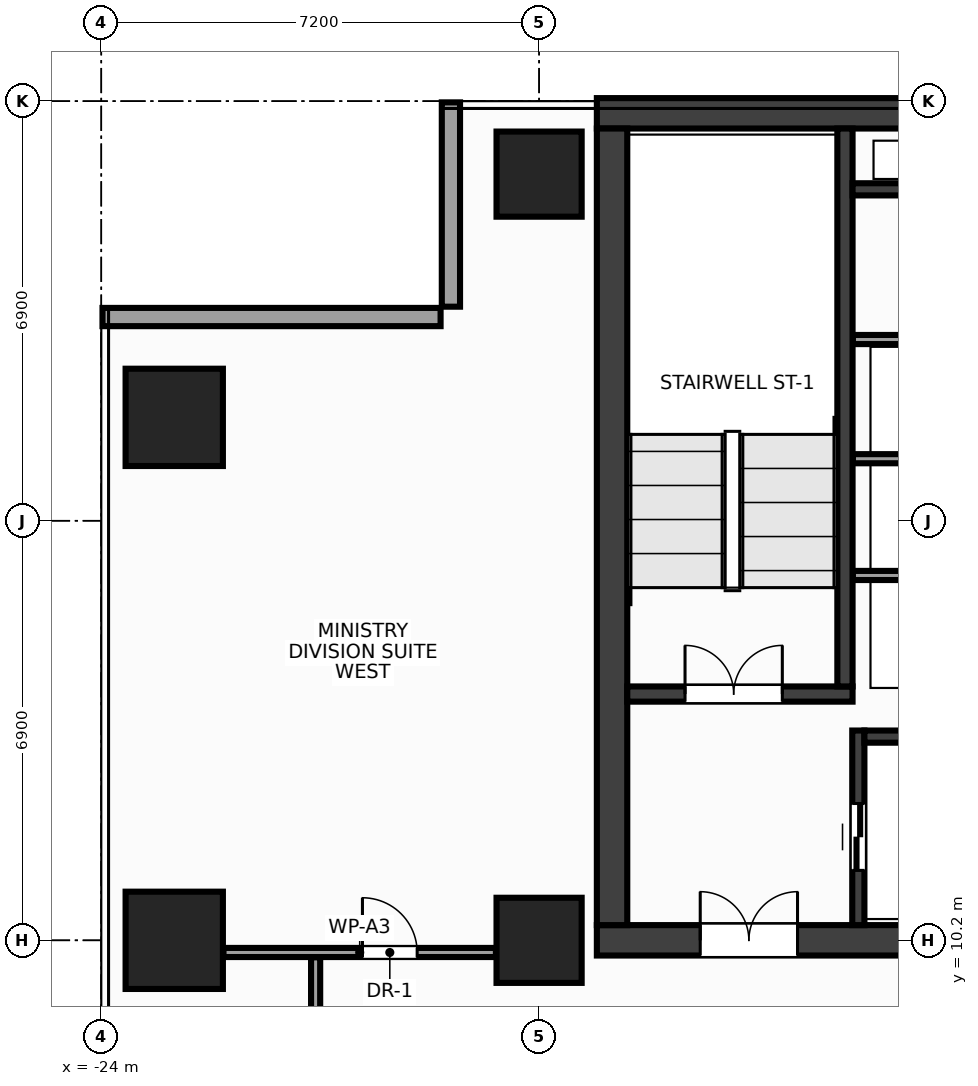
"""IFC4 building model, lengths in metres.
Left out: names, types, materials, properties, quantities, classifications, styles, units other than length and angle.
Written with IfcOpenShell. Run it as: python <this file> out.ifc"""

import sys

from ifc_helpers import new_model, si_unit, direction, frame, frame_2d, origin, origin_2d, place, context, subcontext, project, spatial, rectangle, extrude, source, transform, mapped, element, fill, save


model = new_model("IFC4")
c1 = context("Model", 3, precision=1e-05, world=origin(), true_north=direction((0.0, 1.0)))
c2 = subcontext(c1, "Body", "Model", "MODEL_VIEW")
j1 = project(units=[si_unit("LENGTHUNIT", "METRE"), si_unit("PLANEANGLEUNIT", "RADIAN")], contexts=[c1])
p1 = place(None, origin())
s1 = spatial("IfcSite", under=j1, at=p1, CompositionType="ELEMENT")
p2 = place(p1, origin())
s2 = spatial("IfcBuilding", under=s1, at=p2, CompositionType="ELEMENT")
p3 = place(p2, frame((0.0, 0.0, 210.8)))
s3 = spatial("IfcBuildingStorey", under=s2, at=p3, CompositionType="ELEMENT", Elevation=210.8)
m1 = source(origin(), c2, "Body", "SweptSolid", [
    extrude(rectangle(XDim=31.7, YDim=0.5, at=frame_2d((15.85, 0.0))), origin(), (0.0, 0.0, 1.0), 3.6),
])
p4 = place(p3, frame((-15.85, 23.8, 0.0), z_axis=(0.0, 0.0, 1.0), x_axis=(1.0, 0.0, 0.0)))
e1 = element("IfcWall", 1, at=p4, inside=s3, PredefinedType="SHEAR", context=c2, shape_type="MappedRepresentation", body=[
    mapped(m1, transform((0.0, 0.0, 0.0), x_axis=(1.0, 0.0, 0.0), y_axis=(0.0, 1.0, 0.0), z_axis=(0.0, 0.0, 1.0), scale=1.0)),
])
p5 = place(p3, frame((-15.85, 10.2, 0.0), z_axis=(0.0, 0.0, 1.0), x_axis=(1.0, 0.0, 0.0)))
e2 = element("IfcWall", 2, at=p5, inside=s3, PredefinedType="SHEAR", context=c2, shape_type="MappedRepresentation", body=[
    mapped(m1, transform((0.0, 0.0, 0.0), x_axis=(1.0, 0.0, 0.0), y_axis=(0.0, 1.0, 0.0), z_axis=(0.0, 0.0, 1.0), scale=1.0)),
])
p6 = place(p5, frame((1.7, 0.0, 0.0)))
e3 = element("IfcOpeningElement", 3, at=p6, cuts=e2, PredefinedType="OPENING", context=c2, shape_type="SweptSolid", body=[
    extrude(rectangle(XDim=1.6, YDim=2.15, at=frame_2d((0.8, 1.075))), frame((0.0, 0.262, 0.0), z_axis=(0.0, -1.0, 0.0), x_axis=(1.0, 0.0, 0.0)), (0.0, 0.0, 1.0), 0.524),
])
p7 = place(p5, frame((28.4, 0.0, 0.0)))
e4 = element("IfcOpeningElement", 4, at=p7, cuts=e2, PredefinedType="OPENING", context=c2, shape_type="SweptSolid", body=[
    extrude(rectangle(XDim=1.6, YDim=2.15, at=frame_2d((0.8, 1.075))), frame((0.0, 0.262, 0.0), z_axis=(0.0, -1.0, 0.0), x_axis=(1.0, 0.0, 0.0)), (0.0, 0.0, 1.0), 0.524),
])
p8 = place(p5, frame((15.1, 0.0, 0.0)))
e5 = element("IfcOpeningElement", 5, at=p8, cuts=e2, PredefinedType="OPENING", context=c2, shape_type="SweptSolid", body=[
    extrude(rectangle(XDim=1.5, YDim=2.2, at=frame_2d((0.75, 1.1))), frame((0.0, 0.262, 0.0), z_axis=(0.0, -1.0, 0.0), x_axis=(1.0, 0.0, 0.0)), (0.0, 0.0, 1.0), 0.524),
])
m2 = source(origin(), c2, "Body", "SweptSolid", [
    extrude(rectangle(XDim=13.1, YDim=0.5, at=frame_2d((6.55, 0.0))), origin(), (0.0, 0.0, 1.0), 3.6),
])
p9 = place(p3, frame((-15.6, 10.45, 0.0), z_axis=(0.0, 0.0, 1.0), x_axis=(0.0, 1.0, 0.0)))
e6 = element("IfcWall", 6, at=p9, inside=s3, PredefinedType="SHEAR", context=c2, shape_type="MappedRepresentation", body=[
    mapped(m2, transform((0.0, 0.0, 0.0), x_axis=(1.0, 0.0, 0.0), y_axis=(0.0, 1.0, 0.0), z_axis=(0.0, 0.0, 1.0), scale=1.0)),
])
m3 = source(origin(), c2, "Body", "SweptSolid", [
    extrude(rectangle(XDim=3.705, YDim=0.25, at=frame_2d((1.853, 0.0))), origin(), (0.0, 0.0, 1.0), 3.6),
])
p10 = place(p3, frame((-15.35, 14.25, 0.0), z_axis=(0.0, 0.0, 1.0), x_axis=(1.0, 0.0, 0.0)))
e7 = element("IfcWall", 7, at=p10, inside=s3, PredefinedType="SHEAR", context=c2, shape_type="MappedRepresentation", body=[
    mapped(m3, transform((0.0, 0.0, 0.0), x_axis=(1.0, 0.0, 0.0), y_axis=(0.0, 1.0, 0.0), z_axis=(0.0, 0.0, 1.0), scale=1.0)),
])
p11 = place(p10, frame((0.95, 0.0, 0.0)))
e8 = element("IfcOpeningElement", 8, at=p11, cuts=e7, PredefinedType="OPENING", context=c2, shape_type="SweptSolid", body=[
    extrude(rectangle(XDim=1.6, YDim=2.15, at=frame_2d((0.8, 1.075))), frame((0.0, 0.137, 0.0), z_axis=(0.0, -1.0, 0.0), x_axis=(1.0, 0.0, 0.0)), (0.0, 0.0, 1.0), 0.274),
])
m4 = source(origin(), c2, "Body", "SweptSolid", [
    extrude(rectangle(XDim=9.175, YDim=0.25, at=frame_2d((4.587, 0.0))), origin(), (0.0, 0.0, 1.0), 3.6),
])
p12 = place(p3, frame((-11.77, 14.375, 0.0), z_axis=(0.0, 0.0, 1.0), x_axis=(0.0, 1.0, 0.0)))
e9 = element("IfcWall", 9, at=p12, inside=s3, PredefinedType="SHEAR", context=c2, shape_type="MappedRepresentation", body=[
    mapped(m4, transform((0.0, 0.0, 0.0), x_axis=(1.0, 0.0, 0.0), y_axis=(0.0, 1.0, 0.0), z_axis=(0.0, 0.0, 1.0), scale=1.0)),
])
m5 = source(origin(), c2, "Body", "SweptSolid", [
    extrude(rectangle(XDim=3.2, YDim=0.2, at=frame_2d((1.6, 0.0))), origin(), (0.0, 0.0, 1.0), 3.6),
])
p13 = place(p3, frame((-11.55, 10.45, 0.0), z_axis=(0.0, 0.0, 1.0), x_axis=(0.0, 1.0, 0.0)))
e10 = element("IfcWall", 10, at=p13, inside=s3, PredefinedType="SHEAR", context=c2, shape_type="MappedRepresentation", body=[
    mapped(m5, transform((0.0, 0.0, 0.0), x_axis=(1.0, 0.0, 0.0), y_axis=(0.0, 1.0, 0.0), z_axis=(0.0, 0.0, 1.0), scale=1.0)),
])
p14 = place(p13, frame((0.9, 0.0, 0.0)))
e11 = element("IfcOpeningElement", 11, at=p14, cuts=e10, PredefinedType="OPENING", context=c2, shape_type="SweptSolid", body=[
    extrude(rectangle(XDim=1.1, YDim=2.15, at=frame_2d((0.55, 1.075))), frame((0.0, 0.112, 0.0), z_axis=(0.0, -1.0, 0.0), x_axis=(1.0, 0.0, 0.0)), (0.0, 0.0, 1.0), 0.224),
])
m6 = source(origin(), c2, "Body", "SweptSolid", [
    extrude(rectangle(XDim=2.825, YDim=0.2, at=frame_2d((1.413, 0.0))), origin(), (0.0, 0.0, 1.0), 3.6),
])
p15 = place(p3, frame((-11.45, 13.55, 0.0), z_axis=(0.0, 0.0, 1.0), x_axis=(1.0, 0.0, 0.0)))
e12 = element("IfcWall", 12, at=p15, inside=s3, PredefinedType="SHEAR", context=c2, shape_type="MappedRepresentation", body=[
    mapped(m6, transform((0.0, 0.0, 0.0), x_axis=(1.0, 0.0, 0.0), y_axis=(0.0, 1.0, 0.0), z_axis=(0.0, 0.0, 1.0), scale=1.0)),
])
m7 = source(origin(), c2, "Body", "SweptSolid", [
    extrude(rectangle(XDim=3.02, YDim=0.2, at=frame_2d((1.51, 0.0))), origin(), (0.0, 0.0, 1.0), 3.6),
])
p16 = place(p3, frame((-11.645, 22.55, 0.0), z_axis=(0.0, 0.0, 1.0), x_axis=(1.0, 0.0, 0.0)))
e13 = element("IfcWall", 13, at=p16, inside=s3, PredefinedType="SHEAR", context=c2, shape_type="MappedRepresentation", body=[
    mapped(m7, transform((0.0, 0.0, 0.0), x_axis=(1.0, 0.0, 0.0), y_axis=(0.0, 1.0, 0.0), z_axis=(0.0, 0.0, 1.0), scale=1.0)),
])
m8 = source(origin(), c2, "Body", "SweptSolid", [
    extrude(rectangle(XDim=1.4, YDim=1.4, at=origin_2d()), origin(), (0.0, 0.0, 1.0), 3.6),
])
for number, where, z_axis, x_axis in (
    (14, (-16.8, 10.2, 0.0), (0.0, 0.0, 1.0), (1.0, 0.0, 0.0)),
    (15, (-16.8, 22.8, 0.0), (0.0, 0.0, 1.0), (1.0, 0.0, 0.0)),
):
    element("IfcColumn", number, at=place(p3, frame(where, z_axis=z_axis, x_axis=x_axis)), inside=s3, PredefinedType="COLUMN", context=c2, shape_type="MappedRepresentation", body=[
        mapped(m8, transform((0.0, 0.0, 0.0), x_axis=(1.0, 0.0, 0.0), y_axis=(0.0, 1.0, 0.0), z_axis=(0.0, 0.0, 1.0), scale=1.0)),
    ])
m9 = source(origin(), c2, "Body", "SweptSolid", [
    extrude(rectangle(XDim=1.6, YDim=1.6, at=origin_2d()), origin(), (0.0, 0.0, 1.0), 3.6),
])
for number, where, z_axis, x_axis in (
    (16, (-22.8, 10.2, 0.0), (0.0, 0.0, 1.0), (1.0, 0.0, 0.0)),
    (17, (-22.8, 18.8, 0.0), (0.0, 0.0, 1.0), (1.0, 0.0, 0.0)),
):
    element("IfcColumn", number, at=place(p3, frame(where, z_axis=z_axis, x_axis=x_axis)), inside=s3, PredefinedType="COLUMN", context=c2, shape_type="MappedRepresentation", body=[
        mapped(m9, transform((0.0, 0.0, 0.0), x_axis=(1.0, 0.0, 0.0), y_axis=(0.0, 1.0, 0.0), z_axis=(0.0, 0.0, 1.0), scale=1.0)),
    ])
m10 = source(origin(), c2, "Body", "SweptSolid", [
    extrude(rectangle(XDim=3.36, YDim=0.3, at=frame_2d((1.68, 0.0))), origin(), (0.0, 0.0, 1.0), 2.76),
])
p17 = place(p3, frame((-18.25, 23.98, 0.0), z_axis=(0.0, 0.0, 1.0), x_axis=(0.0, -1.0, 0.0)))
e18 = element("IfcWall", 18, at=p17, inside=s3, PredefinedType="STANDARD", context=c2, shape_type="MappedRepresentation", body=[
    mapped(m10, transform((0.0, 0.0, 0.0), x_axis=(1.0, 0.0, 0.0), y_axis=(0.0, 1.0, 0.0), z_axis=(0.0, 0.0, 1.0), scale=1.0)),
])
m11 = source(origin(), c2, "Body", "SweptSolid", [
    extrude(rectangle(XDim=5.56, YDim=0.3, at=frame_2d((2.78, 0.0))), origin(), (0.0, 0.0, 1.0), 2.76),
])
p18 = place(p3, frame((-18.42, 20.45, 0.0), z_axis=(0.0, 0.0, 1.0), x_axis=(-1.0, 0.0, 0.0)))
e19 = element("IfcWall", 19, at=p18, inside=s3, PredefinedType="STANDARD", context=c2, shape_type="MappedRepresentation", body=[
    mapped(m11, transform((0.0, 0.0, 0.0), x_axis=(1.0, 0.0, 0.0), y_axis=(0.0, 1.0, 0.0), z_axis=(0.0, 0.0, 1.0), scale=1.0)),
])
m12 = source(origin(), c2, "Body", "SweptSolid", [
    extrude(rectangle(XDim=3.01, YDim=0.15, at=frame_2d((1.505, 0.0))), origin(), (0.0, 0.0, 1.0), 3.38),
])
for number, where, z_axis, x_axis in (
    (20, (-11.64, 16.2, 0.0), (0.0, 0.0, 1.0), (1.0, 0.0, 0.0)),
    (21, (-11.64, 18.12, 0.0), (0.0, 0.0, 1.0), (1.0, 0.0, 0.0)),
    (22, (-11.64, 20.08, 0.0), (0.0, 0.0, 1.0), (1.0, 0.0, 0.0)),
):
    element("IfcWall", number, at=place(p3, frame(where, z_axis=z_axis, x_axis=x_axis)), inside=s3, PredefinedType="PARTITIONING", context=c2, shape_type="MappedRepresentation", body=[
        mapped(m12, transform((0.0, 0.0, 0.0), x_axis=(1.0, 0.0, 0.0), y_axis=(0.0, 1.0, 0.0), z_axis=(0.0, 0.0, 1.0), scale=1.0)),
    ])
m13 = source(origin(), c2, "Body", "SweptSolid", [
    extrude(rectangle(XDim=4.48, YDim=0.15, at=frame_2d((2.24, 0.0))), origin(), (0.0, 0.0, 1.0), 2.915),
])
p19 = place(p3, frame((-21.99, 10.0, 0.0), z_axis=(0.0, 0.0, 1.0), x_axis=(1.0, 0.0, 0.0)))
e23 = element("IfcWall", 23, at=p19, inside=s3, PredefinedType="PARTITIONING", context=c2, shape_type="MappedRepresentation", body=[
    mapped(m13, transform((0.0, 0.0, 0.0), x_axis=(1.0, 0.0, 0.0), y_axis=(0.0, 1.0, 0.0), z_axis=(0.0, 0.0, 1.0), scale=1.0)),
])
p20 = place(p19, frame((2.285, 0.0, 0.0)))
e24 = element("IfcOpeningElement", 24, at=p20, cuts=e23, PredefinedType="OPENING", context=c2, shape_type="SweptSolid", body=[
    extrude(rectangle(XDim=0.9, YDim=2.15, at=frame_2d((0.45, 1.075))), frame((0.0, 0.087, 0.0), z_axis=(0.0, -1.0, 0.0), x_axis=(1.0, 0.0, 0.0)), (0.0, 0.0, 1.0), 0.174),
])
m14 = source(origin(), c2, "Body", "SweptSolid", [
    extrude(rectangle(XDim=2.365, YDim=0.15, at=frame_2d((1.183, 0.0))), origin(), (0.0, 0.0, 1.0), 3.38),
])
p21 = place(p3, frame((-20.475, 7.555, 0.0), z_axis=(0.0, 0.0, 1.0), x_axis=(0.0, 1.0, 0.0)))
e25 = element("IfcWall", 25, at=p21, inside=s3, PredefinedType="PARTITIONING", context=c2, shape_type="MappedRepresentation", body=[
    mapped(m14, transform((0.0, 0.0, 0.0), x_axis=(1.0, 0.0, 0.0), y_axis=(0.0, 1.0, 0.0), z_axis=(0.0, 0.0, 1.0), scale=1.0)),
])
m15 = source(origin(), c2, "Body", "SweptSolid", [
    extrude(rectangle(XDim=1.6, YDim=2.15, at=frame_2d((0.8, 1.075))), frame((0.0, 0.025, 0.0), z_axis=(0.0, -1.0, 0.0), x_axis=(1.0, 0.0, 0.0)), (0.0, 0.0, 1.0), 0.05),
])
p22 = place(p11, origin())
e26 = element("IfcDoor", 26, at=p22, inside=s3, OperationType="DOUBLE_DOOR_SINGLE_SWING", PredefinedType="DOOR", context=c2, shape_type="MappedRepresentation", body=[
    mapped(m15, transform((0.0, 0.0, 0.0), x_axis=(1.0, 0.0, 0.0), y_axis=(0.0, 1.0, 0.0), z_axis=(0.0, 0.0, 1.0), scale=1.0)),
])
fill(e8, e26)
p23 = place(p6, origin())
e27 = element("IfcDoor", 27, at=p23, inside=s3, OperationType="DOUBLE_DOOR_SINGLE_SWING", PredefinedType="DOOR", context=c2, shape_type="MappedRepresentation", body=[
    mapped(m15, transform((0.0, 0.0, 0.0), x_axis=(1.0, 0.0, 0.0), y_axis=(0.0, 1.0, 0.0), z_axis=(0.0, 0.0, 1.0), scale=1.0)),
])
fill(e3, e27)
m16 = source(origin(), c2, "Body", "SweptSolid", [
    extrude(rectangle(XDim=1.1, YDim=2.15, at=frame_2d((0.55, 1.075))), frame((0.0, 0.025, 0.0), z_axis=(0.0, -1.0, 0.0), x_axis=(1.0, 0.0, 0.0)), (0.0, 0.0, 1.0), 0.05),
])
p24 = place(p14, origin())
e28 = element("IfcDoor", 28, at=p24, inside=s3, OperationType="DOUBLE_DOOR_SLIDING", PredefinedType="DOOR", context=c2, shape_type="MappedRepresentation", body=[
    mapped(m16, transform((0.0, 0.0, 0.0), x_axis=(1.0, 0.0, 0.0), y_axis=(0.0, 1.0, 0.0), z_axis=(0.0, 0.0, 1.0), scale=1.0)),
])
fill(e11, e28)
m17 = source(origin(), c2, "Body", "SweptSolid", [
    extrude(rectangle(XDim=0.9, YDim=2.15, at=frame_2d((0.45, 1.075))), frame((0.0, 0.025, 0.0), z_axis=(0.0, -1.0, 0.0), x_axis=(1.0, 0.0, 0.0)), (0.0, 0.0, 1.0), 0.05),
])
p25 = place(p20, origin())
e29 = element("IfcDoor", 29, at=p25, inside=s3, OperationType="SINGLE_SWING_LEFT", PredefinedType="DOOR", context=c2, shape_type="MappedRepresentation", body=[
    mapped(m17, transform((0.0, 0.0, 0.0), x_axis=(1.0, 0.0, 0.0), y_axis=(0.0, 1.0, 0.0), z_axis=(0.0, 0.0, 1.0), scale=1.0)),
])
fill(e24, e29)
save(model, sys.argv[1])
